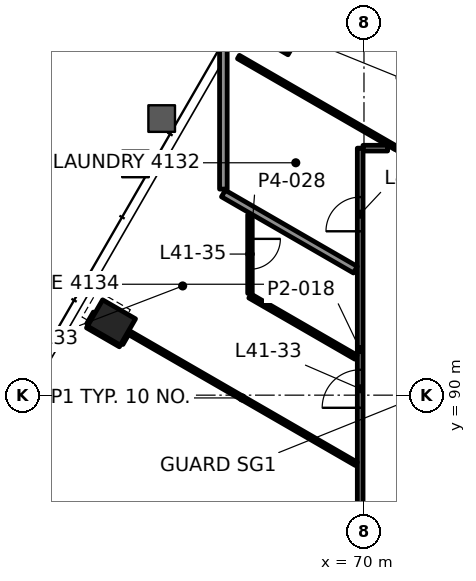
"""IFC4 building model, lengths in metres.
Left out: names, types, materials, properties, quantities, classifications, styles, units other than length and angle.
Written with IfcOpenShell. Run it as: python <this file> out.ifc"""

import sys

from ifc_helpers import new_model, si_unit, direction, frame, frame_2d, origin, origin_2d, place, context, subcontext, project, spatial, rectangle, hollow_rectangle, extrude, element, fill, save


model = new_model("IFC4")
c1 = context("Model", 3, precision=1e-05, world=origin(), true_north=direction((0.0, 1.0)))
c2 = subcontext(c1, "Body", "Model", "MODEL_VIEW")
j1 = project(units=[si_unit("LENGTHUNIT", "METRE"), si_unit("PLANEANGLEUNIT", "RADIAN")], contexts=[c1])
p1 = place(None, origin())
s1 = spatial("IfcSite", under=j1, at=p1, CompositionType="ELEMENT")
p2 = place(p1, origin())
s2 = spatial("IfcBuilding", under=s1, at=p2, CompositionType="ELEMENT")
p3 = place(p2, frame((0.0, 0.0, 179.2)))
s3 = spatial("IfcBuildingStorey", under=s2, at=p3, CompositionType="ELEMENT", Elevation=179.2)
for number, where, z_axis, x_axis in (
    (1, (67.768, 99.553, -0.0), (0.0, 0.0, 1.0), (-0.5, -0.866, 0.0)),
    (2, (63.355, 91.912, -0.0), (0.0, 0.0, 1.0), (-0.5, -0.866, 0.0)),
):
    element("IfcColumn", number, at=place(p3, frame(where, z_axis=z_axis, x_axis=x_axis)), inside=s3, PredefinedType="COLUMN", context=c2, shape_type="SweptSolid", body=[
        extrude(hollow_rectangle(XDim=0.8, YDim=1.0, WallThickness=0.05, at=origin_2d()), origin(), (0.0, 0.0, 1.0), 3.9),
    ])
p4 = place(p3, frame((69.975, 96.5, 0.0), z_axis=(0.0, 0.0, 1.0), x_axis=(1.0, 0.0, 0.0)))
e3 = element("IfcWall", 3, at=p4, inside=s3, PredefinedType="PARTITIONING", context=c2, shape_type="SweptSolid", body=[
    extrude(rectangle(XDim=0.646, YDim=0.15, at=frame_2d((0.323, 0.0))), origin(), (0.0, 0.0, 1.0), 3.1),
])
p5 = place(p3, frame((63.614, 91.359, 0.0), z_axis=(0.0, 0.0, 1.0), x_axis=(0.499557828523, 0.866280541142, 0.0)))
e4 = element("IfcWall", 4, at=p5, inside=s3, PredefinedType="PARTITIONING", context=c2, shape_type="SweptSolid", body=[
    extrude(rectangle(XDim=0.3, YDim=0.1, at=frame_2d((0.15, 0.0))), origin(), (0.0, 0.0, 1.0), 3.022),
])
p6 = place(p3, frame((62.748, 91.859, 0.0), z_axis=(0.0, 0.0, 1.0), x_axis=(0.500044870432, 0.865999496279, 0.0)))
e5 = element("IfcWall", 5, at=p6, inside=s3, PredefinedType="PARTITIONING", context=c2, shape_type="SweptSolid", body=[
    extrude(rectangle(XDim=0.35, YDim=0.1, at=frame_2d((0.175, 0.0))), origin(), (0.0, 0.0, 1.0), 3.1),
])
p7 = place(p3, frame((69.9, 85.9, 0.0), z_axis=(0.0, 0.0, 1.0), x_axis=(0.0, 1.0, 0.0)))
e6 = element("IfcWall", 6, at=p7, inside=s3, PredefinedType="PARTITIONING", context=c2, shape_type="SweptSolid", body=[
    extrude(rectangle(XDim=10.6, YDim=0.15, at=frame_2d((5.3, 0.0))), origin(), (0.0, 0.0, 1.0), 3.022),
])
p8 = place(p7, frame((3.767, 0.0, 0.0)))
e7 = element("IfcOpeningElement", 7, at=p8, cuts=e6, PredefinedType="OPENING", context=c2, shape_type="SweptSolid", body=[
    extrude(rectangle(XDim=1.0, YDim=2.1, at=frame_2d((0.5, 1.05))), frame((0.0, 0.085, 0.0), z_axis=(0.0, -1.0, 0.0), x_axis=(1.0, 0.0, 0.0)), (0.0, 0.0, 1.0), 0.17),
])
p9 = place(p7, frame((8.412, 0.0, 0.0)))
e8 = element("IfcOpeningElement", 8, at=p9, cuts=e6, PredefinedType="OPENING", context=c2, shape_type="SweptSolid", body=[
    extrude(rectangle(XDim=0.9, YDim=2.1, at=frame_2d((0.45, 1.05))), frame((0.0, 0.085, 0.0), z_axis=(0.0, -1.0, 0.0), x_axis=(1.0, 0.0, 0.0)), (0.0, 0.0, 1.0), 0.17),
])
p10 = place(p3, frame((67.0, 94.747, 0.0), z_axis=(0.0, 0.0, 1.0), x_axis=(0.0, -1.0, 0.0)))
e9 = element("IfcWall", 9, at=p10, inside=s3, PredefinedType="PARTITIONING", context=c2, shape_type="SweptSolid", body=[
    extrude(rectangle(XDim=2.068, YDim=0.12, at=frame_2d((1.034, 0.0))), origin(), (0.0, 0.0, 1.0), 3.1),
])
p11 = place(p10, frame((0.634, 0.0, 0.0)))
e10 = element("IfcOpeningElement", 10, at=p11, cuts=e9, PredefinedType="OPENING", context=c2, shape_type="SweptSolid", body=[
    extrude(rectangle(XDim=0.8, YDim=2.1, at=frame_2d((0.4, 1.05))), frame((0.0, 0.07, 0.0), z_axis=(0.0, -1.0, 0.0), x_axis=(1.0, 0.0, 0.0)), (0.0, 0.0, 1.0), 0.14),
])
p12 = place(p3, frame((66.3, 95.423, 0.0), z_axis=(0.0, 0.0, 1.0), x_axis=(0.0, 1.0, 0.0)))
e11 = element("IfcWall", 11, at=p12, inside=s3, PredefinedType="PARTITIONING", context=c2, shape_type="SweptSolid", body=[
    extrude(rectangle(XDim=3.789, YDim=0.2, at=frame_2d((1.895, 0.0))), origin(), (0.0, 0.0, 1.0), 3.022),
])
p13 = place(p3, frame((73.973, 98.518, 0.0), z_axis=(0.0, 0.0, 1.0), x_axis=(-0.866016957496, 0.500014629116, 0.0)))
e12 = element("IfcWall", 12, at=p13, inside=s3, PredefinedType="PARTITIONING", context=c2, shape_type="SweptSolid", body=[
    extrude(rectangle(XDim=6.992, YDim=0.2, at=frame_2d((3.496, 0.0))), origin(), (0.0, 0.0, 1.0), 3.1),
])
p14 = place(p3, frame((70.851, 96.5, 0.0), z_axis=(0.0, 0.0, 1.0), x_axis=(-0.866016914842, 0.500014702992, 0.0)))
e13 = element("IfcWall", 13, at=p14, inside=s3, PredefinedType="PARTITIONING", context=c2, shape_type="SweptSolid", body=[
    extrude(rectangle(XDim=4.797, YDim=0.1, at=frame_2d((2.398, 0.0))), origin(), (0.0, 0.0, 1.0), 3.022),
])
p15 = place(p3, frame((69.773, 93.302, 0.0), z_axis=(0.0, 0.0, 1.0), x_axis=(-0.866046692957, 0.499963124258, 0.0)))
e14 = element("IfcWall", 14, at=p15, inside=s3, PredefinedType="PARTITIONING", context=c2, shape_type="SweptSolid", body=[
    extrude(rectangle(XDim=4.01, YDim=0.2, at=frame_2d((2.005, 0.0))), origin(), (0.0, 0.0, 1.0), 3.1),
])
p16 = place(p3, frame((69.79, 90.998, 0.0), z_axis=(0.0, 0.0, 1.0), x_axis=(-0.866029130051, 0.499993545862, 0.0)))
e15 = element("IfcWall", 15, at=p16, inside=s3, PredefinedType="PARTITIONING", context=c2, shape_type="SweptSolid", body=[
    extrude(rectangle(XDim=3.222, YDim=0.12, at=frame_2d((1.611, 0.0))), origin(), (0.0, 0.0, 1.0), 3.1),
])
p17 = place(p3, frame((69.799, 88.192, 0.0), z_axis=(0.0, 0.0, 1.0), x_axis=(-0.866013353477, 0.500020871164, 0.0)))
e16 = element("IfcWall", 16, at=p17, inside=s3, PredefinedType="PARTITIONING", context=c2, shape_type="SweptSolid", body=[
    extrude(rectangle(XDim=6.94, YDim=0.1, at=frame_2d((3.47, 0.0))), origin(), (0.0, 0.0, 1.0), 3.022),
])
p18 = place(p3, frame((63.588, 91.316, 0.0), z_axis=(0.0, 0.0, 1.0), x_axis=(-0.866039090965, 0.499976292358, 0.0)))
e17 = element("IfcWall", 17, at=p18, inside=s3, PredefinedType="PARTITIONING", context=c2, shape_type="SweptSolid", body=[
    extrude(rectangle(XDim=0.999, YDim=0.1, at=frame_2d((0.5, 0.0))), origin(), (0.0, 0.0, 1.0), 3.022),
])
p19 = place(p8, origin())
e18 = element("IfcDoor", 18, at=p19, inside=s3, OperationType="SINGLE_SWING_RIGHT", PredefinedType="DOOR", context=c2, shape_type="SweptSolid", body=[
    extrude(rectangle(XDim=1.0, YDim=2.1, at=frame_2d((0.5, 1.05))), frame((0.0, 0.025, 0.0), z_axis=(0.0, -1.0, 0.0), x_axis=(1.0, 0.0, 0.0)), (0.0, 0.0, 1.0), 0.05),
])
fill(e7, e18)
p20 = place(p9, origin())
e19 = element("IfcDoor", 19, at=p20, inside=s3, OperationType="SINGLE_SWING_LEFT", PredefinedType="DOOR", context=c2, shape_type="SweptSolid", body=[
    extrude(rectangle(XDim=0.9, YDim=2.1, at=frame_2d((0.45, 1.05))), frame((0.0, 0.025, 0.0), z_axis=(0.0, -1.0, 0.0), x_axis=(1.0, 0.0, 0.0)), (0.0, 0.0, 1.0), 0.05),
])
fill(e8, e19)
p21 = place(p11, origin())
e20 = element("IfcDoor", 20, at=p21, inside=s3, OperationType="SINGLE_SWING_RIGHT", PredefinedType="DOOR", context=c2, shape_type="SweptSolid", body=[
    extrude(rectangle(XDim=0.8, YDim=2.1, at=frame_2d((0.4, 1.05))), frame((0.0, 0.025, 0.0), z_axis=(0.0, -1.0, 0.0), x_axis=(1.0, 0.0, 0.0)), (0.0, 0.0, 1.0), 0.05),
])
fill(e10, e20)
save(model, sys.argv[1])
